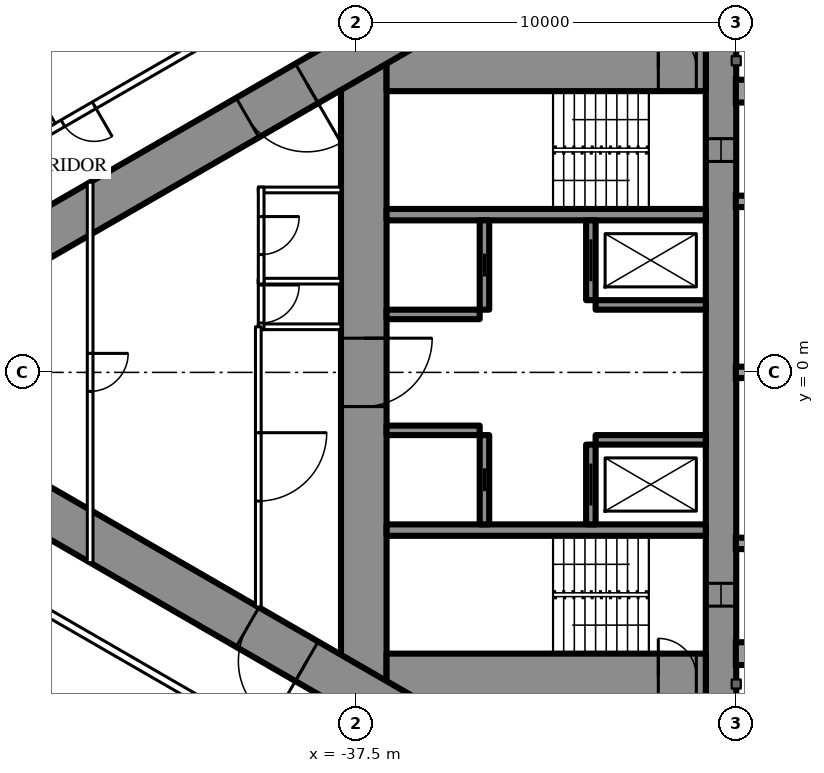
"""IFC4 building model, lengths in metres.
Left out: names, types, materials, properties, quantities, classifications, styles, units other than length and angle.
Written with IfcOpenShell. Run it as: python <this file> out.ifc"""

import sys

from ifc_helpers import new_model, si_unit, direction, frame, frame_2d, origin, place, context, subcontext, project, spatial, rectangle, extrude, element, fill, save


model = new_model("IFC4")
c1 = context("Model", 3, precision=1e-05, world=origin(), true_north=direction((0.0, 1.0)))
c2 = subcontext(c1, "Body", "Model", "MODEL_VIEW")
j1 = project(units=[si_unit("LENGTHUNIT", "METRE"), si_unit("PLANEANGLEUNIT", "RADIAN")], contexts=[c1])
p1 = place(None, origin())
s1 = spatial("IfcSite", under=j1, at=p1, CompositionType="ELEMENT")
p2 = place(p1, origin())
s2 = spatial("IfcBuilding", under=s1, at=p2, CompositionType="ELEMENT")
p3 = place(p2, frame((0.0, 0.0, 60.0)))
s3 = spatial("IfcBuildingStorey", under=s2, at=p3, CompositionType="ELEMENT", Elevation=60.0)
p4 = place(p3, frame((-27.9, 8.6, 0.0), z_axis=(0.0, 0.0, 1.0), x_axis=(0.0, -1.0, 0.0)))
e1 = element("IfcWall", 1, at=p4, inside=s3, PredefinedType="SHEAR", context=c2, shape_type="SweptSolid", body=[
    extrude(rectangle(XDim=17.2, YDim=0.8, at=frame_2d((8.6, 0.0))), origin(), (0.0, 0.0, 1.0), 3.5),
])
p5 = place(p4, frame((2.45, 0.0, 0.6)))
e2 = element("IfcOpeningElement", 2, at=p5, cuts=e1, PredefinedType="OPENING", context=c2, shape_type="SweptSolid", body=[
    extrude(rectangle(XDim=0.6, YDim=2.1, at=frame_2d((0.3, 1.05))), frame((0.0, 0.41, 0.0), z_axis=(0.0, -1.0, 0.0), x_axis=(1.0, 0.0, 0.0)), (0.0, 0.0, 1.0), 0.82),
])
p6 = place(p4, frame((14.15, 0.0, 0.6)))
e3 = element("IfcOpeningElement", 3, at=p6, cuts=e1, PredefinedType="OPENING", context=c2, shape_type="SweptSolid", body=[
    extrude(rectangle(XDim=0.6, YDim=2.1, at=frame_2d((0.3, 1.05))), frame((0.0, 0.41, 0.0), z_axis=(0.0, -1.0, 0.0), x_axis=(1.0, 0.0, 0.0)), (0.0, 0.0, 1.0), 0.82),
])
p7 = place(p3, frame((-37.3, 8.6, 0.0), z_axis=(0.0, 0.0, 1.0), x_axis=(0.0, -1.0, 0.0)))
e4 = element("IfcWall", 4, at=p7, inside=s3, PredefinedType="SHEAR", context=c2, shape_type="SweptSolid", body=[
    extrude(rectangle(XDim=17.2, YDim=1.2, at=frame_2d((8.6, 0.0))), origin(), (0.0, 0.0, 1.0), 3.5),
])
p8 = place(p7, frame((7.7, 0.0, 0.0)))
e5 = element("IfcOpeningElement", 5, at=p8, cuts=e4, PredefinedType="OPENING", context=c2, shape_type="SweptSolid", body=[
    extrude(rectangle(XDim=1.8, YDim=2.2, at=frame_2d((0.9, 1.1))), frame((0.0, 0.61, 0.0), z_axis=(0.0, -1.0, 0.0), x_axis=(1.0, 0.0, 0.0)), (0.0, 0.0, 1.0), 1.22),
])
p9 = place(p3, frame((-28.3, 8.0, 0.0), z_axis=(0.0, 0.0, 1.0), x_axis=(-1.0, 0.0, 0.0)))
e6 = element("IfcWall", 6, at=p9, inside=s3, PredefinedType="SHEAR", context=c2, shape_type="SweptSolid", body=[
    extrude(rectangle(XDim=8.4, YDim=1.2, at=frame_2d((4.2, 0.0))), origin(), (0.0, 0.0, 1.0), 3.5),
])
p10 = place(p9, frame((0.25, 0.0, 0.0)))
e7 = element("IfcOpeningElement", 7, at=p10, cuts=e6, PredefinedType="OPENING", context=c2, shape_type="SweptSolid", body=[
    extrude(rectangle(XDim=1.0, YDim=2.2, at=frame_2d((0.5, 1.1))), frame((0.0, 0.61, 0.0), z_axis=(0.0, -1.0, 0.0), x_axis=(1.0, 0.0, 0.0)), (0.0, 0.0, 1.0), 1.22),
])
p11 = place(p3, frame((-28.3, -8.0, 0.0), z_axis=(0.0, 0.0, 1.0), x_axis=(-1.0, 0.0, 0.0)))
e8 = element("IfcWall", 8, at=p11, inside=s3, PredefinedType="SHEAR", context=c2, shape_type="SweptSolid", body=[
    extrude(rectangle(XDim=8.4, YDim=1.2, at=frame_2d((4.2, 0.0))), origin(), (0.0, 0.0, 1.0), 3.5),
])
p12 = place(p11, frame((0.25, 0.0, 0.0)))
e9 = element("IfcOpeningElement", 9, at=p12, cuts=e8, PredefinedType="OPENING", context=c2, shape_type="SweptSolid", body=[
    extrude(rectangle(XDim=1.0, YDim=2.2, at=frame_2d((0.5, 1.1))), frame((0.0, 0.61, 0.0), z_axis=(0.0, -1.0, 0.0), x_axis=(1.0, 0.0, 0.0)), (0.0, 0.0, 1.0), 1.22),
])
for number, where, z_axis, x_axis in (
    (10, (-28.3, 4.15, 0.0), (0.0, 0.0, 1.0), (-1.0, 0.0, 0.0)),
    (11, (-28.3, -4.15, 0.0), (0.0, 0.0, 1.0), (-1.0, 0.0, 0.0)),
):
    element("IfcWall", number, at=place(p3, frame(where, z_axis=z_axis, x_axis=x_axis)), inside=s3, PredefinedType="SHEAR", context=c2, shape_type="SweptSolid", body=[
        extrude(rectangle(XDim=8.4, YDim=0.3, at=frame_2d((4.2, 0.0))), origin(), (0.0, 0.0, 1.0), 3.5),
    ])
p13 = place(p3, frame((-31.325, 4.0, 0.0), z_axis=(0.0, 0.0, 1.0), x_axis=(0.0, -1.0, 0.0)))
e12 = element("IfcWall", 12, at=p13, inside=s3, PredefinedType="SHEAR", context=c2, shape_type="SweptSolid", body=[
    extrude(rectangle(XDim=2.1, YDim=0.25, at=frame_2d((1.05, 0.0))), origin(), (0.0, 0.0, 1.0), 3.5),
])
p14 = place(p13, frame((0.5, 0.0, 0.0)))
e13 = element("IfcOpeningElement", 13, at=p14, cuts=e12, PredefinedType="OPENING", context=c2, shape_type="SweptSolid", body=[
    extrude(rectangle(XDim=1.1, YDim=2.2, at=frame_2d((0.55, 1.1))), frame((0.0, 0.135, 0.0), z_axis=(0.0, -1.0, 0.0), x_axis=(1.0, 0.0, 0.0)), (0.0, 0.0, 1.0), 0.27),
])
p15 = place(p3, frame((-34.125, 4.0, 0.0), z_axis=(0.0, 0.0, 1.0), x_axis=(0.0, -1.0, 0.0)))
e14 = element("IfcWall", 14, at=p15, inside=s3, PredefinedType="SHEAR", context=c2, shape_type="SweptSolid", body=[
    extrude(rectangle(XDim=2.35, YDim=0.25, at=frame_2d((1.175, 0.0))), origin(), (0.0, 0.0, 1.0), 3.5),
])
p16 = place(p15, frame((0.875, 0.0, 0.0)))
e15 = element("IfcOpeningElement", 15, at=p16, cuts=e14, PredefinedType="OPENING", context=c2, shape_type="SweptSolid", body=[
    extrude(rectangle(XDim=0.6, YDim=2.0, at=frame_2d((0.3, 1.0))), frame((0.0, 0.135, 0.0), z_axis=(0.0, -1.0, 0.0), x_axis=(1.0, 0.0, 0.0)), (0.0, 0.0, 1.0), 0.27),
])
p17 = place(p3, frame((-28.3, 1.775, 0.0), z_axis=(0.0, 0.0, 1.0), x_axis=(-1.0, 0.0, 0.0)))
e16 = element("IfcWall", 16, at=p17, inside=s3, PredefinedType="SHEAR", context=c2, shape_type="SweptSolid", body=[
    extrude(rectangle(XDim=2.9, YDim=0.25, at=frame_2d((1.45, 0.0))), origin(), (0.0, 0.0, 1.0), 3.5),
])
p18 = place(p3, frame((-34.25, 1.525, 0.0), z_axis=(0.0, 0.0, 1.0), x_axis=(-1.0, 0.0, 0.0)))
e17 = element("IfcWall", 17, at=p18, inside=s3, PredefinedType="SHEAR", context=c2, shape_type="SweptSolid", body=[
    extrude(rectangle(XDim=2.45, YDim=0.25, at=frame_2d((1.225, 0.0))), origin(), (0.0, 0.0, 1.0), 3.5),
])
p19 = place(p3, frame((-31.325, -1.9, 0.0), z_axis=(0.0, 0.0, 1.0), x_axis=(0.0, -1.0, 0.0)))
e18 = element("IfcWall", 18, at=p19, inside=s3, PredefinedType="SHEAR", context=c2, shape_type="SweptSolid", body=[
    extrude(rectangle(XDim=2.1, YDim=0.25, at=frame_2d((1.05, 0.0))), origin(), (0.0, 0.0, 1.0), 3.5),
])
p20 = place(p19, frame((0.5, 0.0, 0.0)))
e19 = element("IfcOpeningElement", 19, at=p20, cuts=e18, PredefinedType="OPENING", context=c2, shape_type="SweptSolid", body=[
    extrude(rectangle(XDim=1.1, YDim=2.2, at=frame_2d((0.55, 1.1))), frame((0.0, 0.135, 0.0), z_axis=(0.0, -1.0, 0.0), x_axis=(1.0, 0.0, 0.0)), (0.0, 0.0, 1.0), 0.27),
])
p21 = place(p3, frame((-34.125, -1.65, 0.0), z_axis=(0.0, 0.0, 1.0), x_axis=(0.0, -1.0, 0.0)))
e20 = element("IfcWall", 20, at=p21, inside=s3, PredefinedType="SHEAR", context=c2, shape_type="SweptSolid", body=[
    extrude(rectangle(XDim=2.35, YDim=0.25, at=frame_2d((1.175, 0.0))), origin(), (0.0, 0.0, 1.0), 3.5),
])
p22 = place(p21, frame((0.875, 0.0, 0.0)))
e21 = element("IfcOpeningElement", 21, at=p22, cuts=e20, PredefinedType="OPENING", context=c2, shape_type="SweptSolid", body=[
    extrude(rectangle(XDim=0.6, YDim=2.0, at=frame_2d((0.3, 1.0))), frame((0.0, 0.135, 0.0), z_axis=(0.0, -1.0, 0.0), x_axis=(1.0, 0.0, 0.0)), (0.0, 0.0, 1.0), 0.27),
])
p23 = place(p3, frame((-28.3, -1.775, 0.0), z_axis=(0.0, 0.0, 1.0), x_axis=(-1.0, 0.0, 0.0)))
e22 = element("IfcWall", 22, at=p23, inside=s3, PredefinedType="SHEAR", context=c2, shape_type="SweptSolid", body=[
    extrude(rectangle(XDim=2.9, YDim=0.25, at=frame_2d((1.45, 0.0))), origin(), (0.0, 0.0, 1.0), 3.5),
])
p24 = place(p3, frame((-34.25, -1.525, 0.0), z_axis=(0.0, 0.0, 1.0), x_axis=(-1.0, 0.0, 0.0)))
e23 = element("IfcWall", 23, at=p24, inside=s3, PredefinedType="SHEAR", context=c2, shape_type="SweptSolid", body=[
    extrude(rectangle(XDim=2.45, YDim=0.25, at=frame_2d((1.225, 0.0))), origin(), (0.0, 0.0, 1.0), 3.5),
])
p25 = place(p3, frame((-27.2, 14.3, 0.0), z_axis=(0.0, 0.0, 1.0), x_axis=(-0.866026593062, -0.499997940104, 0.0)))
e24 = element("IfcWall", 24, at=p25, inside=s3, PredefinedType="SHEAR", context=c2, shape_type="SweptSolid", body=[
    extrude(rectangle(XDim=28.946, YDim=1.2, at=frame_2d((14.473, 0.0))), origin(), (0.0, 0.0, 1.0), 3.5),
])
p26 = place(p25, frame((4.6, 0.0, 0.0)))
e25 = element("IfcOpeningElement", 25, at=p26, cuts=e24, PredefinedType="OPENING", context=c2, shape_type="SweptSolid", body=[
    extrude(rectangle(XDim=1.0, YDim=2.2, at=frame_2d((0.5, 1.1))), frame((0.0, 0.61, 0.0), z_axis=(0.0, -1.0, 0.0), x_axis=(1.0, 0.0, 0.0)), (0.0, 0.0, 1.0), 1.22),
])
p27 = place(p25, frame((13.395, 0.0, 0.0)))
e26 = element("IfcOpeningElement", 26, at=p27, cuts=e24, PredefinedType="OPENING", context=c2, shape_type="SweptSolid", body=[
    extrude(rectangle(XDim=1.8, YDim=2.2, at=frame_2d((0.9, 1.1))), frame((0.0, 0.61, 0.0), z_axis=(0.0, -1.0, 0.0), x_axis=(1.0, 0.0, 0.0)), (0.0, 0.0, 1.0), 1.22),
])
p28 = place(p3, frame((-27.2, -14.3, 0.0), z_axis=(0.0, 0.0, 1.0), x_axis=(-0.866024021859, 0.500002393557, 0.0)))
e27 = element("IfcWall", 27, at=p28, inside=s3, PredefinedType="SHEAR", context=c2, shape_type="SweptSolid", body=[
    extrude(rectangle(XDim=27.907, YDim=1.2, at=frame_2d((13.954, 0.0))), origin(), (0.0, 0.0, 1.0), 3.5),
])
p29 = place(p28, frame((4.6, 0.0, 0.0)))
e28 = element("IfcOpeningElement", 28, at=p29, cuts=e27, PredefinedType="OPENING", context=c2, shape_type="SweptSolid", body=[
    extrude(rectangle(XDim=1.0, YDim=2.2, at=frame_2d((0.5, 1.1))), frame((0.0, 0.61, 0.0), z_axis=(0.0, -1.0, 0.0), x_axis=(1.0, 0.0, 0.0)), (0.0, 0.0, 1.0), 1.22),
])
p30 = place(p28, frame((13.395, 0.0, 0.0)))
e29 = element("IfcOpeningElement", 29, at=p30, cuts=e27, PredefinedType="OPENING", context=c2, shape_type="SweptSolid", body=[
    extrude(rectangle(XDim=1.8, YDim=2.2, at=frame_2d((0.9, 1.1))), frame((0.0, 0.61, 0.0), z_axis=(0.0, -1.0, 0.0), x_axis=(1.0, 0.0, 0.0)), (0.0, 0.0, 1.0), 1.22),
])
p31 = place(p3, frame((-37.7, 10.894, 0.0), z_axis=(0.0, 0.0, 1.0), x_axis=(-0.866027905338, -0.499995667157, 0.0)))
e30 = element("IfcWall", 30, at=p31, inside=s3, PredefinedType="PARTITIONING", context=c2, shape_type="SweptSolid", body=[
    extrude(rectangle(XDim=21.787, YDim=0.2, at=frame_2d((10.894, 0.0))), origin(), (0.0, 0.0, 1.0), 3.25),
])
p32 = place(p31, frame((20.237, 0.0, 0.0)))
e31 = element("IfcOpeningElement", 31, at=p32, cuts=e30, PredefinedType="OPENING", context=c2, shape_type="SweptSolid", body=[
    extrude(rectangle(XDim=0.95, YDim=2.2, at=frame_2d((0.475, 1.1))), frame((0.0, 0.11, 0.0), z_axis=(0.0, -1.0, 0.0), x_axis=(1.0, 0.0, 0.0)), (0.0, 0.0, 1.0), 0.22),
])
p33 = place(p31, frame((7.73, 0.0, 0.0)))
e32 = element("IfcOpeningElement", 32, at=p33, cuts=e30, PredefinedType="OPENING", context=c2, shape_type="SweptSolid", body=[
    extrude(rectangle(XDim=0.95, YDim=2.2, at=frame_2d((0.475, 1.1))), frame((0.0, 0.11, 0.0), z_axis=(0.0, -1.0, 0.0), x_axis=(1.0, 0.0, 0.0)), (0.0, 0.0, 1.0), 0.22),
])
p34 = place(p3, frame((-36.92, -11.344, 0.0), z_axis=(0.0, 0.0, 1.0), x_axis=(-0.866028313256, 0.499994960614, 0.0)))
e33 = element("IfcWall", 33, at=p34, inside=s3, PredefinedType="PARTITIONING", context=c2, shape_type="SweptSolid", body=[
    extrude(rectangle(XDim=22.568, YDim=0.2, at=frame_2d((11.284, 0.0))), origin(), (0.0, 0.0, 1.0), 3.25),
])
p35 = place(p34, frame((12.68, 0.0, 0.0)))
e34 = element("IfcOpeningElement", 34, at=p35, cuts=e33, PredefinedType="OPENING", context=c2, shape_type="SweptSolid", body=[
    extrude(rectangle(XDim=0.95, YDim=2.2, at=frame_2d((0.475, 1.1))), frame((0.0, 0.11, 0.0), z_axis=(0.0, -1.0, 0.0), x_axis=(1.0, 0.0, 0.0)), (0.0, 0.0, 1.0), 0.22),
])
p36 = place(p34, frame((3.35, 0.0, 0.0)))
e35 = element("IfcOpeningElement", 35, at=p36, cuts=e33, PredefinedType="OPENING", context=c2, shape_type="SweptSolid", body=[
    extrude(rectangle(XDim=1.0, YDim=2.2, at=frame_2d((0.5, 1.1))), frame((0.0, 0.11, 0.0), z_axis=(0.0, -1.0, 0.0), x_axis=(1.0, 0.0, 0.0)), (0.0, 0.0, 1.0), 0.22),
])
p37 = place(p3, frame((-45.483, 6.515, 0.0), z_axis=(0.0, 0.0, 1.0), x_axis=(-0.500006934395, 0.866021400173, 0.0)))
e36 = element("IfcWall", 36, at=p37, inside=s3, PredefinedType="PARTITIONING", context=c2, shape_type="SweptSolid", body=[
    extrude(rectangle(XDim=2.6, YDim=0.15, at=frame_2d((1.3, 0.0))), origin(), (0.0, 0.0, 1.0), 3.25),
])
p38 = place(p37, frame((0.9, 0.0, 0.0)))
e37 = element("IfcOpeningElement", 37, at=p38, cuts=e36, PredefinedType="OPENING", context=c2, shape_type="SweptSolid", body=[
    extrude(rectangle(XDim=0.8, YDim=2.2, at=frame_2d((0.4, 1.1))), frame((0.0, 0.085, 0.0), z_axis=(0.0, -1.0, 0.0), x_axis=(1.0, 0.0, 0.0)), (0.0, 0.0, 1.0), 0.17),
])
for number, where, z_axis, x_axis in (
    (38, (-37.9, 1.2, 0.0), (0.0, 0.0, 1.0), (-1.0, 0.0, 0.0)),
    (39, (-37.9, 2.4, 0.0), (0.0, 0.0, 1.0), (-1.0, 0.0, 0.0)),
    (40, (-37.9, 4.8, 0.0), (0.0, 0.0, 1.0), (-1.0, 0.0, 0.0)),
):
    element("IfcWall", number, at=place(p3, frame(where, z_axis=z_axis, x_axis=x_axis)), inside=s3, PredefinedType="PARTITIONING", context=c2, shape_type="SweptSolid", body=[
        extrude(rectangle(XDim=2.175, YDim=0.15, at=frame_2d((1.087, 0.0))), origin(), (0.0, 0.0, 1.0), 3.25),
    ])
p39 = place(p3, frame((-40.0, 2.475, 0.0), z_axis=(0.0, 0.0, 1.0), x_axis=(0.0, -1.0, 0.0)))
e41 = element("IfcWall", 41, at=p39, inside=s3, PredefinedType="PARTITIONING", context=c2, shape_type="SweptSolid", body=[
    extrude(rectangle(XDim=1.35, YDim=0.15, at=frame_2d((0.675, 0.0))), origin(), (0.0, 0.0, 1.0), 3.25),
])
p40 = place(p39, frame((0.175, 0.0, 0.0)))
e42 = element("IfcOpeningElement", 42, at=p40, cuts=e41, PredefinedType="OPENING", context=c2, shape_type="SweptSolid", body=[
    extrude(rectangle(XDim=1.0, YDim=2.2, at=frame_2d((0.5, 1.1))), frame((0.0, 0.085, 0.0), z_axis=(0.0, -1.0, 0.0), x_axis=(1.0, 0.0, 0.0)), (0.0, 0.0, 1.0), 0.17),
])
p41 = place(p3, frame((-40.0, 4.875, 0.0), z_axis=(0.0, 0.0, 1.0), x_axis=(0.0, -1.0, 0.0)))
e43 = element("IfcWall", 43, at=p41, inside=s3, PredefinedType="PARTITIONING", context=c2, shape_type="SweptSolid", body=[
    extrude(rectangle(XDim=2.55, YDim=0.15, at=frame_2d((1.275, 0.0))), origin(), (0.0, 0.0, 1.0), 3.25),
])
p42 = place(p41, frame((0.775, 0.0, 0.0)))
e44 = element("IfcOpeningElement", 44, at=p42, cuts=e43, PredefinedType="OPENING", context=c2, shape_type="SweptSolid", body=[
    extrude(rectangle(XDim=1.0, YDim=2.2, at=frame_2d((0.5, 1.1))), frame((0.0, 0.085, 0.0), z_axis=(0.0, -1.0, 0.0), x_axis=(1.0, 0.0, 0.0)), (0.0, 0.0, 1.0), 0.17),
])
p43 = place(p3, frame((-40.075, 1.2, 0.0), z_axis=(0.0, 0.0, 1.0), x_axis=(0.0, -1.0, 0.0)))
e45 = element("IfcWall", 45, at=p43, inside=s3, PredefinedType="PARTITIONING", context=c2, shape_type="SweptSolid", body=[
    extrude(rectangle(XDim=7.374, YDim=0.15, at=frame_2d((3.687, 0.0))), origin(), (0.0, 0.0, 1.0), 3.25),
])
p44 = place(p43, frame((2.787, 0.0, 0.0)))
e46 = element("IfcOpeningElement", 46, at=p44, cuts=e45, PredefinedType="OPENING", context=c2, shape_type="SweptSolid", body=[
    extrude(rectangle(XDim=1.8, YDim=2.2, at=frame_2d((0.9, 1.1))), frame((0.0, 0.085, 0.0), z_axis=(0.0, -1.0, 0.0), x_axis=(1.0, 0.0, 0.0)), (0.0, 0.0, 1.0), 0.17),
])
p45 = place(p3, frame((-44.5, 5.005, 0.0), z_axis=(0.0, 0.0, 1.0), x_axis=(0.0, -1.0, 0.0)))
e47 = element("IfcWall", 47, at=p45, inside=s3, PredefinedType="PARTITIONING", context=c2, shape_type="SweptSolid", body=[
    extrude(rectangle(XDim=10.009, YDim=0.15, at=frame_2d((5.005, 0.0))), origin(), (0.0, 0.0, 1.0), 2.45),
])
p46 = place(p45, frame((4.505, 0.0, 0.0)))
e48 = element("IfcOpeningElement", 48, at=p46, cuts=e47, PredefinedType="OPENING", context=c2, shape_type="SweptSolid", body=[
    extrude(rectangle(XDim=1.0, YDim=2.2, at=frame_2d((0.5, 1.1))), frame((0.0, 0.085, 0.0), z_axis=(0.0, -1.0, 0.0), x_axis=(1.0, 0.0, 0.0)), (0.0, 0.0, 1.0), 0.17),
])
p47 = place(p33, origin())
e49 = element("IfcDoor", 49, at=p47, inside=s3, OperationType="SINGLE_SWING_LEFT", PredefinedType="DOOR", context=c2, shape_type="SweptSolid", body=[
    extrude(rectangle(XDim=0.95, YDim=2.2, at=frame_2d((0.475, 1.1))), frame((0.0, 0.025, 0.0), z_axis=(0.0, -1.0, 0.0), x_axis=(1.0, 0.0, 0.0)), (0.0, 0.0, 1.0), 0.05),
])
fill(e32, e49)
p48 = place(p40, origin())
e50 = element("IfcDoor", 50, at=p48, inside=s3, OperationType="SINGLE_SWING_LEFT", PredefinedType="DOOR", context=c2, shape_type="SweptSolid", body=[
    extrude(rectangle(XDim=1.0, YDim=2.2, at=frame_2d((0.5, 1.1))), frame((0.0, 0.025, 0.0), z_axis=(0.0, -1.0, 0.0), x_axis=(1.0, 0.0, 0.0)), (0.0, 0.0, 1.0), 0.05),
])
fill(e42, e50)
p49 = place(p42, origin())
e51 = element("IfcDoor", 51, at=p49, inside=s3, OperationType="SINGLE_SWING_LEFT", PredefinedType="DOOR", context=c2, shape_type="SweptSolid", body=[
    extrude(rectangle(XDim=1.0, YDim=2.2, at=frame_2d((0.5, 1.1))), frame((0.0, 0.025, 0.0), z_axis=(0.0, -1.0, 0.0), x_axis=(1.0, 0.0, 0.0)), (0.0, 0.0, 1.0), 0.05),
])
fill(e44, e51)
p50 = place(p44, origin())
e52 = element("IfcDoor", 52, at=p50, inside=s3, OperationType="DOUBLE_DOOR_SINGLE_SWING", PredefinedType="DOOR", context=c2, shape_type="SweptSolid", body=[
    extrude(rectangle(XDim=1.8, YDim=2.2, at=frame_2d((0.9, 1.1))), frame((0.0, 0.025, 0.0), z_axis=(0.0, -1.0, 0.0), x_axis=(1.0, 0.0, 0.0)), (0.0, 0.0, 1.0), 0.05),
])
fill(e46, e52)
p51 = place(p46, origin())
e53 = element("IfcDoor", 53, at=p51, inside=s3, OperationType="SINGLE_SWING_LEFT", PredefinedType="DOOR", context=c2, shape_type="SweptSolid", body=[
    extrude(rectangle(XDim=1.0, YDim=2.2, at=frame_2d((0.5, 1.1))), frame((0.0, 0.025, 0.0), z_axis=(0.0, -1.0, 0.0), x_axis=(1.0, 0.0, 0.0)), (0.0, 0.0, 1.0), 0.05),
])
fill(e48, e53)
p52 = place(p27, origin())
e54 = element("IfcDoor", 54, at=p52, inside=s3, OperationType="DOUBLE_DOOR_SINGLE_SWING", PredefinedType="DOOR", context=c2, shape_type="SweptSolid", body=[
    extrude(rectangle(XDim=1.8, YDim=2.2, at=frame_2d((0.9, 1.1))), frame((0.0, 0.025, 0.0), z_axis=(0.0, -1.0, 0.0), x_axis=(1.0, 0.0, 0.0)), (0.0, 0.0, 1.0), 0.05),
])
fill(e26, e54)
p53 = place(p30, origin())
e55 = element("IfcDoor", 55, at=p53, inside=s3, OperationType="DOUBLE_DOOR_SINGLE_SWING", PredefinedType="DOOR", context=c2, shape_type="SweptSolid", body=[
    extrude(rectangle(XDim=1.8, YDim=2.2, at=frame_2d((0.9, 1.1))), frame((0.0, 0.025, 0.0), z_axis=(0.0, -1.0, 0.0), x_axis=(1.0, 0.0, 0.0)), (0.0, 0.0, 1.0), 0.05),
])
fill(e29, e55)
p54 = place(p8, origin())
e56 = element("IfcDoor", 56, at=p54, inside=s3, OperationType="DOUBLE_DOOR_SINGLE_SWING", PredefinedType="DOOR", context=c2, shape_type="SweptSolid", body=[
    extrude(rectangle(XDim=1.8, YDim=2.2, at=frame_2d((0.9, 1.1))), frame((0.0, 0.025, 0.0), z_axis=(0.0, -1.0, 0.0), x_axis=(1.0, 0.0, 0.0)), (0.0, 0.0, 1.0), 0.05),
])
fill(e5, e56)
p55 = place(p10, origin())
e57 = element("IfcDoor", 57, at=p55, inside=s3, OperationType="SINGLE_SWING_RIGHT", PredefinedType="DOOR", context=c2, shape_type="SweptSolid", body=[
    extrude(rectangle(XDim=1.0, YDim=2.2, at=frame_2d((0.5, 1.1))), frame((0.0, 0.025, 0.0), z_axis=(0.0, -1.0, 0.0), x_axis=(1.0, 0.0, 0.0)), (0.0, 0.0, 1.0), 0.05),
])
fill(e7, e57)
p56 = place(p12, origin())
e58 = element("IfcDoor", 58, at=p56, inside=s3, OperationType="SINGLE_SWING_RIGHT", PredefinedType="DOOR", context=c2, shape_type="SweptSolid", body=[
    extrude(rectangle(XDim=1.0, YDim=2.2, at=frame_2d((0.5, 1.1))), frame((0.0, 0.025, 0.0), z_axis=(0.0, -1.0, 0.0), x_axis=(1.0, 0.0, 0.0)), (0.0, 0.0, 1.0), 0.05),
])
fill(e9, e58)
p57 = place(p14, origin())
e59 = element("IfcDoor", 59, at=p57, inside=s3, OperationType="SLIDING_TO_LEFT", PredefinedType="USERDEFINED", context=c2, shape_type="SweptSolid", body=[
    extrude(rectangle(XDim=1.1, YDim=2.2, at=frame_2d((0.55, 1.1))), frame((0.0, 0.025, 0.0), z_axis=(0.0, -1.0, 0.0), x_axis=(1.0, 0.0, 0.0)), (0.0, 0.0, 1.0), 0.05),
])
fill(e13, e59)
p58 = place(p20, origin())
e60 = element("IfcDoor", 60, at=p58, inside=s3, OperationType="SLIDING_TO_LEFT", PredefinedType="USERDEFINED", context=c2, shape_type="SweptSolid", body=[
    extrude(rectangle(XDim=1.1, YDim=2.2, at=frame_2d((0.55, 1.1))), frame((0.0, 0.025, 0.0), z_axis=(0.0, -1.0, 0.0), x_axis=(1.0, 0.0, 0.0)), (0.0, 0.0, 1.0), 0.05),
])
fill(e19, e60)
p59 = place(p16, origin())
e61 = element("IfcDoor", 61, at=p59, inside=s3, OperationType="SLIDING_TO_LEFT", PredefinedType="DOOR", context=c2, shape_type="SweptSolid", body=[
    extrude(rectangle(XDim=0.6, YDim=2.0, at=frame_2d((0.3, 1.0))), frame((0.0, 0.025, 0.0), z_axis=(0.0, -1.0, 0.0), x_axis=(1.0, 0.0, 0.0)), (0.0, 0.0, 1.0), 0.05),
])
fill(e15, e61)
p60 = place(p22, origin())
e62 = element("IfcDoor", 62, at=p60, inside=s3, OperationType="SLIDING_TO_LEFT", PredefinedType="DOOR", context=c2, shape_type="SweptSolid", body=[
    extrude(rectangle(XDim=0.6, YDim=2.0, at=frame_2d((0.3, 1.0))), frame((0.0, 0.025, 0.0), z_axis=(0.0, -1.0, 0.0), x_axis=(1.0, 0.0, 0.0)), (0.0, 0.0, 1.0), 0.05),
])
fill(e21, e62)
p61 = place(p5, origin())
e63 = element("IfcWindow", 63, at=p61, inside=s3, PartitioningType="SINGLE_PANEL", PredefinedType="WINDOW", context=c2, shape_type="SweptSolid", body=[
    extrude(rectangle(XDim=0.6, YDim=2.1, at=frame_2d((0.3, 1.05))), frame((0.0, 0.03, 0.0), z_axis=(0.0, -1.0, 0.0), x_axis=(1.0, 0.0, 0.0)), (0.0, 0.0, 1.0), 0.06),
])
fill(e2, e63)
p62 = place(p6, origin())
e64 = element("IfcWindow", 64, at=p62, inside=s3, PartitioningType="SINGLE_PANEL", PredefinedType="WINDOW", context=c2, shape_type="SweptSolid", body=[
    extrude(rectangle(XDim=0.6, YDim=2.1, at=frame_2d((0.3, 1.05))), frame((0.0, 0.03, 0.0), z_axis=(0.0, -1.0, 0.0), x_axis=(1.0, 0.0, 0.0)), (0.0, 0.0, 1.0), 0.06),
])
fill(e3, e64)
save(model, sys.argv[1])
